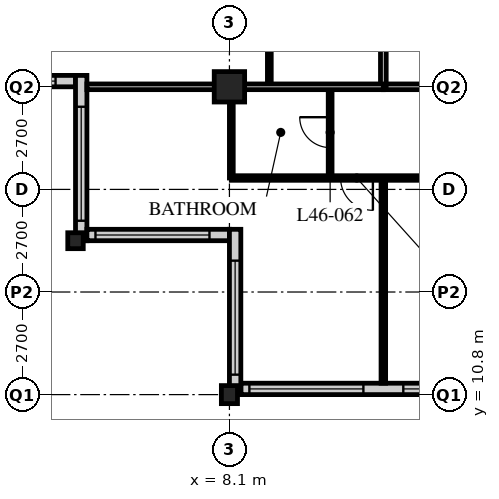
"""IFC4 building model, lengths in metres.
Left out: names, types, materials, properties, quantities, classifications, styles, units other than length and angle.
Written with IfcOpenShell. Run it as: python <this file> out.ifc"""

import sys

from ifc_helpers import new_model, si_unit, direction, frame, frame_2d, origin, origin_2d, place, context, subcontext, project, spatial, rectangle, hollow_rectangle, i_section, extrude, element, fill, save


model = new_model("IFC4")
c1 = context("Model", 3, precision=1e-05, world=origin(), true_north=direction((0.0, 1.0)))
c2 = subcontext(c1, "Body", "Model", "MODEL_VIEW")
j1 = project(units=[si_unit("LENGTHUNIT", "METRE"), si_unit("PLANEANGLEUNIT", "RADIAN")], contexts=[c1])
p1 = place(None, origin())
s1 = spatial("IfcSite", under=j1, at=p1, CompositionType="ELEMENT")
p2 = place(p1, origin())
s2 = spatial("IfcBuilding", under=s1, at=p2, CompositionType="ELEMENT")
p3 = place(p2, frame((0.0, 0.0, 181.2)))
s3 = spatial("IfcBuildingStorey", under=s2, at=p3, CompositionType="ELEMENT", Elevation=181.2)
p4 = place(p3, frame((4.05, 14.85, 0.0), z_axis=(0.0, 0.0, 1.0), x_axis=(1.0, 0.0, 0.0)))
e1 = element("IfcColumn", 1, at=p4, inside=s3, PredefinedType="COLUMN", context=c2, shape_type="SweptSolid", body=[
    extrude(i_section(OverallWidth=0.407, OverallDepth=0.419, WebThickness=0.031, FlangeThickness=0.049, FilletRadius=0.015, at=origin_2d()), origin(), (0.0, 0.0, 1.0), 3.6),
])
p5 = place(p3, frame((8.1, 10.8, 0.0), z_axis=(0.0, 0.0, 1.0), x_axis=(1.0, 0.0, 0.0)))
e2 = element("IfcColumn", 2, at=p5, inside=s3, PredefinedType="COLUMN", context=c2, shape_type="SweptSolid", body=[
    extrude(i_section(OverallWidth=0.424, OverallDepth=0.475, WebThickness=0.048, FlangeThickness=0.077, FilletRadius=0.015, at=origin_2d()), origin(), (0.0, 0.0, 1.0), 3.6),
])
p6 = place(p3, frame((8.1, 18.9, 0.0), z_axis=(0.0, 0.0, 1.0), x_axis=(1.0, 0.0, 0.0)))
e3 = element("IfcColumn", 3, at=p6, inside=s3, PredefinedType="COLUMN", context=c2, shape_type="SweptSolid", body=[
    extrude(hollow_rectangle(XDim=0.8, YDim=0.8, WallThickness=0.08, at=origin_2d()), origin(), (0.0, 0.0, 1.0), 3.6),
])
p7 = place(p3, frame((8.4, 10.95, 0.0), z_axis=(0.0, 0.0, 1.0), x_axis=(1.0, 0.0, 0.0)))
e4 = element("IfcWall", 4, at=p7, inside=s3, PredefinedType="SOLIDWALL", context=c2, shape_type="SweptSolid", body=[
    extrude(rectangle(XDim=40.2, YDim=0.3, at=frame_2d((20.1, 0.0))), origin(), (0.0, 0.0, 1.0), 3.39),
])
p8 = place(p7, frame((0.225, 0.0, 0.6)))
e5 = element("IfcOpeningElement", 5, at=p8, cuts=e4, PredefinedType="OPENING", context=c2, shape_type="SweptSolid", body=[
    extrude(rectangle(XDim=3.0, YDim=2.4, at=frame_2d((1.5, 1.2))), frame((0.0, 0.16, 0.0), z_axis=(0.0, -1.0, 0.0), x_axis=(1.0, 0.0, 0.0)), (0.0, 0.0, 1.0), 0.32),
])
p9 = place(p7, frame((4.275, 0.0, 0.6)))
e6 = element("IfcOpeningElement", 6, at=p9, cuts=e4, PredefinedType="OPENING", context=c2, shape_type="SweptSolid", body=[
    extrude(rectangle(XDim=3.0, YDim=2.4, at=frame_2d((1.5, 1.2))), frame((0.0, 0.16, 0.0), z_axis=(0.0, -1.0, 0.0), x_axis=(1.0, 0.0, 0.0)), (0.0, 0.0, 1.0), 0.32),
])
p10 = place(p7, frame((8.325, 0.0, 0.6)))
e7 = element("IfcOpeningElement", 7, at=p10, cuts=e4, PredefinedType="OPENING", context=c2, shape_type="SweptSolid", body=[
    extrude(rectangle(XDim=3.0, YDim=2.4, at=frame_2d((1.5, 1.2))), frame((0.0, 0.16, 0.0), z_axis=(0.0, -1.0, 0.0), x_axis=(1.0, 0.0, 0.0)), (0.0, 0.0, 1.0), 0.32),
])
p11 = place(p7, frame((12.375, 0.0, 0.6)))
e8 = element("IfcOpeningElement", 8, at=p11, cuts=e4, PredefinedType="OPENING", context=c2, shape_type="SweptSolid", body=[
    extrude(rectangle(XDim=3.0, YDim=2.4, at=frame_2d((1.5, 1.2))), frame((0.0, 0.16, 0.0), z_axis=(0.0, -1.0, 0.0), x_axis=(1.0, 0.0, 0.0)), (0.0, 0.0, 1.0), 0.32),
])
p12 = place(p7, frame((16.425, 0.0, 0.6)))
e9 = element("IfcOpeningElement", 9, at=p12, cuts=e4, PredefinedType="OPENING", context=c2, shape_type="SweptSolid", body=[
    extrude(rectangle(XDim=3.0, YDim=2.4, at=frame_2d((1.5, 1.2))), frame((0.0, 0.16, 0.0), z_axis=(0.0, -1.0, 0.0), x_axis=(1.0, 0.0, 0.0)), (0.0, 0.0, 1.0), 0.32),
])
p13 = place(p7, frame((20.475, 0.0, 0.6)))
e10 = element("IfcOpeningElement", 10, at=p13, cuts=e4, PredefinedType="OPENING", context=c2, shape_type="SweptSolid", body=[
    extrude(rectangle(XDim=3.0, YDim=2.4, at=frame_2d((1.5, 1.2))), frame((0.0, 0.16, 0.0), z_axis=(0.0, -1.0, 0.0), x_axis=(1.0, 0.0, 0.0)), (0.0, 0.0, 1.0), 0.32),
])
p14 = place(p7, frame((24.525, 0.0, 0.6)))
e11 = element("IfcOpeningElement", 11, at=p14, cuts=e4, PredefinedType="OPENING", context=c2, shape_type="SweptSolid", body=[
    extrude(rectangle(XDim=3.0, YDim=2.4, at=frame_2d((1.5, 1.2))), frame((0.0, 0.16, 0.0), z_axis=(0.0, -1.0, 0.0), x_axis=(1.0, 0.0, 0.0)), (0.0, 0.0, 1.0), 0.32),
])
p15 = place(p7, frame((28.575, 0.0, 0.6)))
e12 = element("IfcOpeningElement", 12, at=p15, cuts=e4, PredefinedType="OPENING", context=c2, shape_type="SweptSolid", body=[
    extrude(rectangle(XDim=3.0, YDim=2.4, at=frame_2d((1.5, 1.2))), frame((0.0, 0.16, 0.0), z_axis=(0.0, -1.0, 0.0), x_axis=(1.0, 0.0, 0.0)), (0.0, 0.0, 1.0), 0.32),
])
p16 = place(p7, frame((32.625, 0.0, 0.6)))
e13 = element("IfcOpeningElement", 13, at=p16, cuts=e4, PredefinedType="OPENING", context=c2, shape_type="SweptSolid", body=[
    extrude(rectangle(XDim=3.0, YDim=2.4, at=frame_2d((1.5, 1.2))), frame((0.0, 0.16, 0.0), z_axis=(0.0, -1.0, 0.0), x_axis=(1.0, 0.0, 0.0)), (0.0, 0.0, 1.0), 0.32),
])
p17 = place(p7, frame((36.675, 0.0, 0.6)))
e14 = element("IfcOpeningElement", 14, at=p17, cuts=e4, PredefinedType="OPENING", context=c2, shape_type="SweptSolid", body=[
    extrude(rectangle(XDim=3.0, YDim=2.4, at=frame_2d((1.5, 1.2))), frame((0.0, 0.16, 0.0), z_axis=(0.0, -1.0, 0.0), x_axis=(1.0, 0.0, 0.0)), (0.0, 0.0, 1.0), 0.32),
])
p18 = place(p3, frame((0.3, 19.05, 0.0), z_axis=(0.0, 0.0, 1.0), x_axis=(1.0, 0.0, 0.0)))
e15 = element("IfcWall", 15, at=p18, inside=s3, PredefinedType="SOLIDWALL", context=c2, shape_type="SweptSolid", body=[
    extrude(rectangle(XDim=3.75, YDim=0.3, at=frame_2d((1.875, 0.0))), origin(), (0.0, 0.0, 1.0), 3.39),
])
p19 = place(p18, frame((0.225, 0.0, 0.6)))
e16 = element("IfcOpeningElement", 16, at=p19, cuts=e15, PredefinedType="OPENING", context=c2, shape_type="SweptSolid", body=[
    extrude(rectangle(XDim=3.0, YDim=2.0, at=frame_2d((1.5, 1.0))), frame((0.0, 0.16, 0.0), z_axis=(0.0, -1.0, 0.0), x_axis=(1.0, 0.0, 0.0)), (0.0, 0.0, 1.0), 0.32),
])
p20 = place(p3, frame((4.2, 19.2, 0.0), z_axis=(0.0, 0.0, 1.0), x_axis=(0.0, -1.0, 0.0)))
e17 = element("IfcWall", 17, at=p20, inside=s3, PredefinedType="SOLIDWALL", context=c2, shape_type="SweptSolid", body=[
    extrude(rectangle(XDim=4.35, YDim=0.3, at=frame_2d((2.175, 0.0))), origin(), (0.0, 0.0, 1.0), 3.39),
])
p21 = place(p20, frame((0.825, 0.0, 0.6)))
e18 = element("IfcOpeningElement", 18, at=p21, cuts=e17, PredefinedType="OPENING", context=c2, shape_type="SweptSolid", body=[
    extrude(rectangle(XDim=3.0, YDim=2.0, at=frame_2d((1.5, 1.0))), frame((0.0, 0.16, 0.0), z_axis=(0.0, -1.0, 0.0), x_axis=(1.0, 0.0, 0.0)), (0.0, 0.0, 1.0), 0.32),
])
p22 = place(p3, frame((4.35, 15.0, 0.0), z_axis=(0.0, 0.0, 1.0), x_axis=(1.0, 0.0, 0.0)))
e19 = element("IfcWall", 19, at=p22, inside=s3, PredefinedType="SOLIDWALL", context=c2, shape_type="SweptSolid", body=[
    extrude(rectangle(XDim=3.75, YDim=0.3, at=frame_2d((1.875, 0.0))), origin(), (0.0, 0.0, 1.0), 3.39),
])
p23 = place(p22, frame((0.225, 0.0, 0.6)))
e20 = element("IfcOpeningElement", 20, at=p23, cuts=e19, PredefinedType="OPENING", context=c2, shape_type="SweptSolid", body=[
    extrude(rectangle(XDim=3.0, YDim=2.0, at=frame_2d((1.5, 1.0))), frame((0.0, 0.16, 0.0), z_axis=(0.0, -1.0, 0.0), x_axis=(1.0, 0.0, 0.0)), (0.0, 0.0, 1.0), 0.32),
])
p24 = place(p3, frame((8.25, 15.15, 0.0), z_axis=(0.0, 0.0, 1.0), x_axis=(0.0, -1.0, 0.0)))
e21 = element("IfcWall", 21, at=p24, inside=s3, PredefinedType="SOLIDWALL", context=c2, shape_type="SweptSolid", body=[
    extrude(rectangle(XDim=4.35, YDim=0.3, at=frame_2d((2.175, 0.0))), origin(), (0.0, 0.0, 1.0), 3.39),
])
p25 = place(p24, frame((0.825, 0.0, 0.6)))
e22 = element("IfcOpeningElement", 22, at=p25, cuts=e21, PredefinedType="OPENING", context=c2, shape_type="SweptSolid", body=[
    extrude(rectangle(XDim=3.0, YDim=2.0, at=frame_2d((1.5, 1.0))), frame((0.0, 0.16, 0.0), z_axis=(0.0, -1.0, 0.0), x_axis=(1.0, 0.0, 0.0)), (0.0, 0.0, 1.0), 0.32),
])
p26 = place(p3, frame((12.15, 18.9, 0.0), z_axis=(0.0, 0.0, 1.0), x_axis=(1.0, 0.0, 0.0)))
e23 = element("IfcWall", 23, at=p26, inside=s3, PredefinedType="PARTITIONING", context=c2, shape_type="SweptSolid", body=[
    extrude(rectangle(XDim=32.4, YDim=0.15, at=frame_2d((16.2, 0.0))), origin(), (0.0, 0.0, 1.0), 2.778),
])
p27 = place(p26, frame((4.95, 0.0, 0.0)))
e24 = element("IfcOpeningElement", 24, at=p27, cuts=e23, PredefinedType="OPENING", context=c2, shape_type="SweptSolid", body=[
    extrude(rectangle(XDim=1.0, YDim=2.1, at=frame_2d((0.5, 1.05))), frame((0.0, 0.085, 0.0), z_axis=(0.0, -1.0, 0.0), x_axis=(1.0, 0.0, 0.0)), (0.0, 0.0, 1.0), 0.17),
])
p28 = place(p26, frame((13.05, 0.0, 0.0)))
e25 = element("IfcOpeningElement", 25, at=p28, cuts=e23, PredefinedType="OPENING", context=c2, shape_type="SweptSolid", body=[
    extrude(rectangle(XDim=1.0, YDim=2.1, at=frame_2d((0.5, 1.05))), frame((0.0, 0.085, 0.0), z_axis=(0.0, -1.0, 0.0), x_axis=(1.0, 0.0, 0.0)), (0.0, 0.0, 1.0), 0.17),
])
p29 = place(p26, frame((21.15, 0.0, 0.0)))
e26 = element("IfcOpeningElement", 26, at=p29, cuts=e23, PredefinedType="OPENING", context=c2, shape_type="SweptSolid", body=[
    extrude(rectangle(XDim=1.0, YDim=2.1, at=frame_2d((0.5, 1.05))), frame((0.0, 0.085, 0.0), z_axis=(0.0, -1.0, 0.0), x_axis=(1.0, 0.0, 0.0)), (0.0, 0.0, 1.0), 0.17),
])
p30 = place(p26, frame((1.525, 0.0, 0.0)))
e27 = element("IfcOpeningElement", 27, at=p30, cuts=e23, PredefinedType="OPENING", context=c2, shape_type="SweptSolid", body=[
    extrude(rectangle(XDim=1.0, YDim=2.1, at=frame_2d((0.5, 1.05))), frame((0.0, 0.085, 0.0), z_axis=(0.0, -1.0, 0.0), x_axis=(1.0, 0.0, 0.0)), (0.0, 0.0, 1.0), 0.17),
])
p31 = place(p26, frame((29.875, 0.0, 0.0)))
e28 = element("IfcOpeningElement", 28, at=p31, cuts=e23, PredefinedType="OPENING", context=c2, shape_type="SweptSolid", body=[
    extrude(rectangle(XDim=1.0, YDim=2.1, at=frame_2d((0.5, 1.05))), frame((0.0, 0.085, 0.0), z_axis=(0.0, -1.0, 0.0), x_axis=(1.0, 0.0, 0.0)), (0.0, 0.0, 1.0), 0.17),
])
p32 = place(p3, frame((12.15, 18.9, 0.0), z_axis=(0.0, 0.0, 1.0), x_axis=(0.0, 1.0, 0.0)))
e29 = element("IfcWall", 29, at=p32, inside=s3, PredefinedType="PARTITIONING", context=c2, shape_type="SweptSolid", body=[
    extrude(rectangle(XDim=28.35, YDim=0.15, at=frame_2d((14.175, 0.0))), origin(), (0.0, 0.0, 1.0), 3.39),
])
p33 = place(p32, frame((2.35, 0.0, 0.0)))
e30 = element("IfcOpeningElement", 30, at=p33, cuts=e29, PredefinedType="OPENING", context=c2, shape_type="SweptSolid", body=[
    extrude(rectangle(XDim=1.0, YDim=2.1, at=frame_2d((0.5, 1.05))), frame((0.0, 0.085, 0.0), z_axis=(0.0, -1.0, 0.0), x_axis=(1.0, 0.0, 0.0)), (0.0, 0.0, 1.0), 0.17),
])
p34 = place(p32, frame((6.4, 0.0, 0.0)))
e31 = element("IfcOpeningElement", 31, at=p34, cuts=e29, PredefinedType="OPENING", context=c2, shape_type="SweptSolid", body=[
    extrude(rectangle(XDim=1.0, YDim=2.1, at=frame_2d((0.5, 1.05))), frame((0.0, 0.085, 0.0), z_axis=(0.0, -1.0, 0.0), x_axis=(1.0, 0.0, 0.0)), (0.0, 0.0, 1.0), 0.17),
])
p35 = place(p32, frame((8.5, 0.0, 0.0)))
e32 = element("IfcOpeningElement", 32, at=p35, cuts=e29, PredefinedType="OPENING", context=c2, shape_type="SweptSolid", body=[
    extrude(rectangle(XDim=1.0, YDim=2.1, at=frame_2d((0.5, 1.05))), frame((0.0, 0.085, 0.0), z_axis=(0.0, -1.0, 0.0), x_axis=(1.0, 0.0, 0.0)), (0.0, 0.0, 1.0), 0.17),
])
p36 = place(p32, frame((16.6, 0.0, 0.0)))
e33 = element("IfcOpeningElement", 33, at=p36, cuts=e29, PredefinedType="OPENING", context=c2, shape_type="SweptSolid", body=[
    extrude(rectangle(XDim=1.0, YDim=2.1, at=frame_2d((0.5, 1.05))), frame((0.0, 0.085, 0.0), z_axis=(0.0, -1.0, 0.0), x_axis=(1.0, 0.0, 0.0)), (0.0, 0.0, 1.0), 0.17),
])
p37 = place(p32, frame((26.65, 0.0, 0.0)))
e34 = element("IfcOpeningElement", 34, at=p37, cuts=e29, PredefinedType="OPENING", context=c2, shape_type="SweptSolid", body=[
    extrude(rectangle(XDim=1.0, YDim=2.1, at=frame_2d((0.5, 1.05))), frame((0.0, 0.085, 0.0), z_axis=(0.0, -1.0, 0.0), x_axis=(1.0, 0.0, 0.0)), (0.0, 0.0, 1.0), 0.17),
])
p38 = place(p3, frame((9.15, 18.9, 0.0), z_axis=(0.0, 0.0, 1.0), x_axis=(0.0, 1.0, 0.0)))
e35 = element("IfcWall", 35, at=p38, inside=s3, PredefinedType="PARTITIONING", context=c2, shape_type="SweptSolid", body=[
    extrude(rectangle(XDim=2.2, YDim=0.1, at=frame_2d((1.1, 0.0))), origin(), (0.0, 0.0, 1.0), 3.39),
])
p39 = place(p3, frame((10.75, 18.9, 0.0), z_axis=(0.0, 0.0, 1.0), x_axis=(0.0, -1.0, 0.0)))
e36 = element("IfcWall", 36, at=p39, inside=s3, PredefinedType="PARTITIONING", context=c2, shape_type="SweptSolid", body=[
    extrude(rectangle(XDim=2.4, YDim=0.1, at=frame_2d((1.2, 0.0))), origin(), (0.0, 0.0, 1.0), 3.39),
])
p40 = place(p39, frame((0.8, 0.0, 0.0)))
e37 = element("IfcOpeningElement", 37, at=p40, cuts=e36, PredefinedType="OPENING", context=c2, shape_type="SweptSolid", body=[
    extrude(rectangle(XDim=0.8, YDim=2.1, at=frame_2d((0.4, 1.05))), frame((0.0, 0.06, 0.0), z_axis=(0.0, -1.0, 0.0), x_axis=(1.0, 0.0, 0.0)), (0.0, 0.0, 1.0), 0.12),
])
p41 = place(p3, frame((8.15, 18.9, 0.0), z_axis=(0.0, 0.0, 1.0), x_axis=(0.0, -1.0, 0.0)))
e38 = element("IfcWall", 38, at=p41, inside=s3, PredefinedType="PARTITIONING", context=c2, shape_type="SweptSolid", body=[
    extrude(rectangle(XDim=2.4, YDim=0.1, at=frame_2d((1.2, 0.0))), origin(), (0.0, 0.0, 1.0), 2.778),
])
p42 = place(p3, frame((8.15, 16.5, 0.0), z_axis=(0.0, 0.0, 1.0), x_axis=(1.0, 0.0, 0.0)))
e39 = element("IfcWall", 39, at=p42, inside=s3, PredefinedType="PARTITIONING", context=c2, shape_type="SweptSolid", body=[
    extrude(rectangle(XDim=40.4, YDim=0.12, at=frame_2d((20.2, 0.0))), origin(), (0.0, 0.0, 1.0), 3.39),
])
p43 = place(p42, frame((9.025, 0.0, 0.0)))
e40 = element("IfcOpeningElement", 40, at=p43, cuts=e39, PredefinedType="OPENING", context=c2, shape_type="SweptSolid", body=[
    extrude(rectangle(XDim=0.85, YDim=2.1, at=frame_2d((0.425, 1.05))), frame((0.0, 0.07, 0.0), z_axis=(0.0, -1.0, 0.0), x_axis=(1.0, 0.0, 0.0)), (0.0, 0.0, 1.0), 0.14),
])
p44 = place(p42, frame((12.425, 0.0, 0.0)))
e41 = element("IfcOpeningElement", 41, at=p44, cuts=e39, PredefinedType="OPENING", context=c2, shape_type="SweptSolid", body=[
    extrude(rectangle(XDim=0.85, YDim=2.1, at=frame_2d((0.425, 1.05))), frame((0.0, 0.07, 0.0), z_axis=(0.0, -1.0, 0.0), x_axis=(1.0, 0.0, 0.0)), (0.0, 0.0, 1.0), 0.14),
])
p45 = place(p42, frame((17.125, 0.0, 0.0)))
e42 = element("IfcOpeningElement", 42, at=p45, cuts=e39, PredefinedType="OPENING", context=c2, shape_type="SweptSolid", body=[
    extrude(rectangle(XDim=0.85, YDim=2.1, at=frame_2d((0.425, 1.05))), frame((0.0, 0.07, 0.0), z_axis=(0.0, -1.0, 0.0), x_axis=(1.0, 0.0, 0.0)), (0.0, 0.0, 1.0), 0.14),
])
p46 = place(p42, frame((20.525, 0.0, 0.0)))
e43 = element("IfcOpeningElement", 43, at=p46, cuts=e39, PredefinedType="OPENING", context=c2, shape_type="SweptSolid", body=[
    extrude(rectangle(XDim=0.85, YDim=2.1, at=frame_2d((0.425, 1.05))), frame((0.0, 0.07, 0.0), z_axis=(0.0, -1.0, 0.0), x_axis=(1.0, 0.0, 0.0)), (0.0, 0.0, 1.0), 0.14),
])
p47 = place(p42, frame((25.225, 0.0, 0.0)))
e44 = element("IfcOpeningElement", 44, at=p47, cuts=e39, PredefinedType="OPENING", context=c2, shape_type="SweptSolid", body=[
    extrude(rectangle(XDim=0.85, YDim=2.1, at=frame_2d((0.425, 1.05))), frame((0.0, 0.07, 0.0), z_axis=(0.0, -1.0, 0.0), x_axis=(1.0, 0.0, 0.0)), (0.0, 0.0, 1.0), 0.14),
])
p48 = place(p42, frame((28.625, 0.0, 0.0)))
e45 = element("IfcOpeningElement", 45, at=p48, cuts=e39, PredefinedType="OPENING", context=c2, shape_type="SweptSolid", body=[
    extrude(rectangle(XDim=0.85, YDim=2.1, at=frame_2d((0.425, 1.05))), frame((0.0, 0.07, 0.0), z_axis=(0.0, -1.0, 0.0), x_axis=(1.0, 0.0, 0.0)), (0.0, 0.0, 1.0), 0.14),
])
p49 = place(p42, frame((6.725, 0.0, 0.0)))
e46 = element("IfcOpeningElement", 46, at=p49, cuts=e39, PredefinedType="OPENING", context=c2, shape_type="SweptSolid", body=[
    extrude(rectangle(XDim=0.85, YDim=2.1, at=frame_2d((0.425, 1.05))), frame((0.0, 0.07, 0.0), z_axis=(0.0, -1.0, 0.0), x_axis=(1.0, 0.0, 0.0)), (0.0, 0.0, 1.0), 0.14),
])
p50 = place(p42, frame((2.875, 0.0, 0.0)))
e47 = element("IfcOpeningElement", 47, at=p50, cuts=e39, PredefinedType="OPENING", context=c2, shape_type="SweptSolid", body=[
    extrude(rectangle(XDim=0.85, YDim=2.1, at=frame_2d((0.425, 1.05))), frame((0.0, 0.07, 0.0), z_axis=(0.0, -1.0, 0.0), x_axis=(1.0, 0.0, 0.0)), (0.0, 0.0, 1.0), 0.14),
])
p51 = place(p42, frame((32.825, 0.0, 0.0)))
e48 = element("IfcOpeningElement", 48, at=p51, cuts=e39, PredefinedType="OPENING", context=c2, shape_type="SweptSolid", body=[
    extrude(rectangle(XDim=0.85, YDim=2.1, at=frame_2d((0.425, 1.05))), frame((0.0, 0.07, 0.0), z_axis=(0.0, -1.0, 0.0), x_axis=(1.0, 0.0, 0.0)), (0.0, 0.0, 1.0), 0.14),
])
p52 = place(p42, frame((36.675, 0.0, 0.0)))
e49 = element("IfcOpeningElement", 49, at=p52, cuts=e39, PredefinedType="OPENING", context=c2, shape_type="SweptSolid", body=[
    extrude(rectangle(XDim=0.85, YDim=2.1, at=frame_2d((0.425, 1.05))), frame((0.0, 0.07, 0.0), z_axis=(0.0, -1.0, 0.0), x_axis=(1.0, 0.0, 0.0)), (0.0, 0.0, 1.0), 0.14),
])
p53 = place(p3, frame((12.15, 16.5, 0.0), z_axis=(0.0, 0.0, 1.0), x_axis=(0.0, -1.0, 0.0)))
e50 = element("IfcWall", 50, at=p53, inside=s3, PredefinedType="PARTITIONING", context=c2, shape_type="SweptSolid", body=[
    extrude(rectangle(XDim=5.4, YDim=0.12, at=frame_2d((2.7, 0.0))), origin(), (0.0, 0.0, 1.0), 3.39),
])
p54 = place(p3, frame((4.35, 18.9, 0.0), z_axis=(0.0, 0.0, 1.0), x_axis=(1.0, 0.0, 0.0)))
e51 = element("IfcWall", 51, at=p54, inside=s3, PredefinedType="PARTITIONING", context=c2, shape_type="SweptSolid", body=[
    extrude(rectangle(XDim=7.8, YDim=0.15, at=frame_2d((3.9, 0.0))), origin(), (0.0, 0.0, 1.0), 2.778),
])
p55 = place(p8, origin())
e52 = element("IfcWindow", 52, at=p55, inside=s3, PartitioningType="SINGLE_PANEL", PredefinedType="WINDOW", context=c2, shape_type="SweptSolid", body=[
    extrude(rectangle(XDim=3.0, YDim=2.4, at=frame_2d((1.5, 1.2))), frame((0.0, 0.03, 0.0), z_axis=(0.0, -1.0, 0.0), x_axis=(1.0, 0.0, 0.0)), (0.0, 0.0, 1.0), 0.06),
])
fill(e5, e52)
p56 = place(p9, origin())
e53 = element("IfcWindow", 53, at=p56, inside=s3, PartitioningType="SINGLE_PANEL", PredefinedType="WINDOW", context=c2, shape_type="SweptSolid", body=[
    extrude(rectangle(XDim=3.0, YDim=2.4, at=frame_2d((1.5, 1.2))), frame((0.0, 0.03, 0.0), z_axis=(0.0, -1.0, 0.0), x_axis=(1.0, 0.0, 0.0)), (0.0, 0.0, 1.0), 0.06),
])
fill(e6, e53)
p57 = place(p19, origin())
e54 = element("IfcWindow", 54, at=p57, inside=s3, PartitioningType="SINGLE_PANEL", PredefinedType="WINDOW", context=c2, shape_type="SweptSolid", body=[
    extrude(rectangle(XDim=3.0, YDim=2.0, at=frame_2d((1.5, 1.0))), frame((0.0, 0.03, 0.0), z_axis=(0.0, -1.0, 0.0), x_axis=(1.0, 0.0, 0.0)), (0.0, 0.0, 1.0), 0.06),
])
fill(e16, e54)
p58 = place(p21, origin())
e55 = element("IfcWindow", 55, at=p58, inside=s3, PartitioningType="SINGLE_PANEL", PredefinedType="WINDOW", context=c2, shape_type="SweptSolid", body=[
    extrude(rectangle(XDim=3.0, YDim=2.0, at=frame_2d((1.5, 1.0))), frame((0.0, 0.03, 0.0), z_axis=(0.0, -1.0, 0.0), x_axis=(1.0, 0.0, 0.0)), (0.0, 0.0, 1.0), 0.06),
])
fill(e18, e55)
p59 = place(p23, origin())
e56 = element("IfcWindow", 56, at=p59, inside=s3, PartitioningType="SINGLE_PANEL", PredefinedType="WINDOW", context=c2, shape_type="SweptSolid", body=[
    extrude(rectangle(XDim=3.0, YDim=2.0, at=frame_2d((1.5, 1.0))), frame((0.0, 0.03, 0.0), z_axis=(0.0, -1.0, 0.0), x_axis=(1.0, 0.0, 0.0)), (0.0, 0.0, 1.0), 0.06),
])
fill(e20, e56)
p60 = place(p25, origin())
e57 = element("IfcWindow", 57, at=p60, inside=s3, PartitioningType="SINGLE_PANEL", PredefinedType="WINDOW", context=c2, shape_type="SweptSolid", body=[
    extrude(rectangle(XDim=3.0, YDim=2.0, at=frame_2d((1.5, 1.0))), frame((0.0, 0.03, 0.0), z_axis=(0.0, -1.0, 0.0), x_axis=(1.0, 0.0, 0.0)), (0.0, 0.0, 1.0), 0.06),
])
fill(e22, e57)
p61 = place(p40, origin())
e58 = element("IfcDoor", 58, at=p61, inside=s3, OperationType="SINGLE_SWING_RIGHT", PredefinedType="DOOR", context=c2, shape_type="SweptSolid", body=[
    extrude(rectangle(XDim=0.8, YDim=2.1, at=frame_2d((0.4, 1.05))), frame((0.0, 0.025, 0.0), z_axis=(0.0, -1.0, 0.0), x_axis=(1.0, 0.0, 0.0)), (0.0, 0.0, 1.0), 0.05),
])
fill(e37, e58)
p62 = place(p50, origin())
e59 = element("IfcDoor", 59, at=p62, inside=s3, OperationType="SINGLE_SWING_LEFT", PredefinedType="DOOR", context=c2, shape_type="SweptSolid", body=[
    extrude(rectangle(XDim=0.85, YDim=2.1, at=frame_2d((0.425, 1.05))), frame((0.0, 0.025, 0.0), z_axis=(0.0, -1.0, 0.0), x_axis=(1.0, 0.0, 0.0)), (0.0, 0.0, 1.0), 0.05),
])
fill(e47, e59)
save(model, sys.argv[1])
